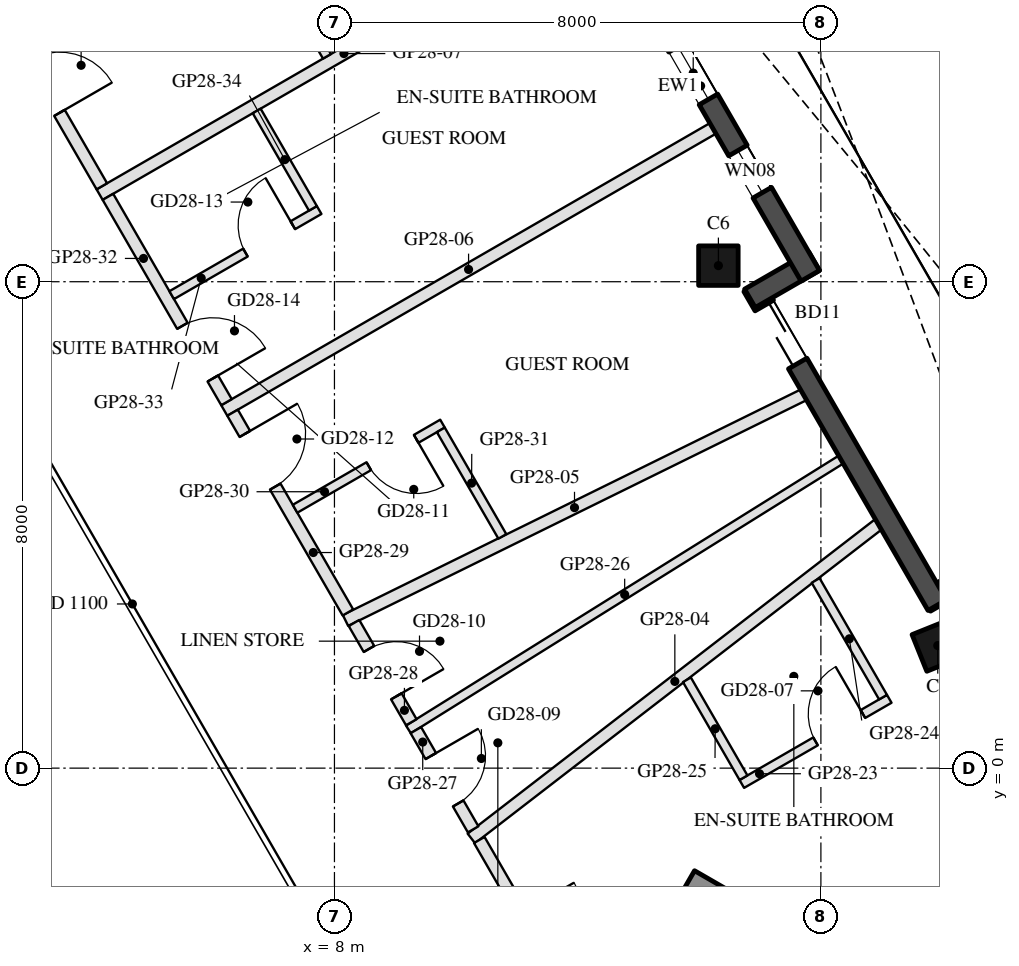
"""IFC4 building model, lengths in metres.
Left out: names, types, materials, properties, quantities, classifications, styles, units other than length and angle.
Written with IfcOpenShell. Run it as: python <this file> out.ifc"""

import sys

from ifc_helpers import new_model, si_unit, direction, frame, frame_2d, origin, origin_2d, place, context, subcontext, project, spatial, rectangle, hollow_rectangle, extrude, boolean, halfspace, element, fill, save


model = new_model("IFC4")
c1 = context("Model", 3, precision=1e-05, world=origin(), true_north=direction((0.0, 1.0)))
c2 = subcontext(c1, "Body", "Model", "MODEL_VIEW")
j1 = project(units=[si_unit("LENGTHUNIT", "METRE"), si_unit("PLANEANGLEUNIT", "RADIAN")], contexts=[c1])
p1 = place(None, origin())
s1 = spatial("IfcSite", under=j1, at=p1, CompositionType="ELEMENT")
p2 = place(p1, origin())
s2 = spatial("IfcBuilding", under=s1, at=p2, CompositionType="ELEMENT")
p3 = place(p2, frame((0.0, 0.0, 287.4)))
s3 = spatial("IfcBuildingStorey", under=s2, at=p3, CompositionType="ELEMENT", Elevation=287.4)
p4 = place(p3, frame((17.922, 2.016, 0.0), z_axis=(-0.161441555696, -0.022914285325, 0.986616216987), x_axis=(0.49507293815, -0.866715878813, 0.060879974747)))
e1 = element("IfcColumn", 1, at=p4, inside=s3, PredefinedType="COLUMN", context=c2, shape_type="SweptSolid", body=[
    boolean("DIFFERENCE", boolean("DIFFERENCE", extrude(hollow_rectangle(XDim=0.65, YDim=0.65, WallThickness=0.03, at=origin_2d()), origin(), (0.0, 0.0, 1.0), 3.75), halfspace(frame((0.0, 0.0, 0.04), z_axis=(0.0, 0.0, 1.0), x_axis=(1.0, 0.0, 0.0)), True)), halfspace(frame((0.0, 0.0, 3.711), z_axis=(0.0, 0.0, 1.0), x_axis=(1.0, 0.0, 0.0)), False)),
])
p5 = place(p3, frame((14.314, 8.264, 0.0), z_axis=(-0.13115563542, -0.07578460883, 0.988460870425), x_axis=(-0.500216662803, 0.86590027717, 1.5862574e-05)))
e2 = element("IfcColumn", 2, at=p5, inside=s3, PredefinedType="COLUMN", context=c2, shape_type="SweptSolid", body=[
    boolean("DIFFERENCE", boolean("DIFFERENCE", extrude(hollow_rectangle(XDim=0.65, YDim=0.65, WallThickness=0.03, at=origin_2d()), origin(), (0.0, 0.0, 1.0), 3.743), halfspace(frame((0.0, 0.0, 0.037), z_axis=(0.0, 0.0, 1.0), x_axis=(1.0, 0.0, 0.0)), True)), halfspace(frame((0.0, 0.0, 3.706), z_axis=(0.0, 0.0, 1.0), x_axis=(1.0, 0.0, 0.0)), False)),
])
p6 = place(p3, frame((18.772, 3.344, 0.0), z_axis=(0.0, 0.0, 1.0), x_axis=(-0.866005645448, -0.500034220881, 0.0)))
e3 = element("IfcWall", 3, at=p6, inside=s3, PredefinedType="SOLIDWALL", context=c2, shape_type="SweptSolid", body=[
    extrude(rectangle(XDim=1.22, YDim=0.35, at=frame_2d((0.61, 0.0))), origin(), (0.0, 0.0, 1.0), 3.55),
])
p7 = place(p3, frame((17.913, 2.68, 0.0), z_axis=(0.0, 0.0, 1.0), x_axis=(-0.499985371027, 0.866033849661, 0.0)))
e4 = element("IfcWall", 4, at=p7, inside=s3, PredefinedType="SOLIDWALL", context=c2, shape_type="SweptSolid", body=[
    extrude(rectangle(XDim=6.055, YDim=0.35, at=frame_2d((3.028, 0.0))), origin(), (0.0, 0.0, 1.0), 3.55),
])
p8 = place(p7, frame((4.59, 0.0, 0.0)))
e5 = element("IfcOpeningElement", 5, at=p8, cuts=e4, PredefinedType="OPENING", context=c2, shape_type="SweptSolid", body=[
    extrude(rectangle(XDim=1.1, YDim=2.4, at=frame_2d((0.55, 1.2))), frame((0.0, 0.185, 0.0), z_axis=(0.0, -1.0, 0.0), x_axis=(1.0, 0.0, 0.0)), (0.0, 0.0, 1.0), 0.37),
])
p9 = place(p3, frame((14.833, 7.727, 0.0), z_axis=(0.0, 0.0, 1.0), x_axis=(0.866142280446, 0.499797509021, 0.0)))
e6 = element("IfcWall", 6, at=p9, inside=s3, PredefinedType="SOLIDWALL", context=c2, shape_type="SweptSolid", body=[
    extrude(rectangle(XDim=1.22, YDim=0.35, at=frame_2d((0.61, 0.0))), origin(), (0.0, 0.0, 1.0), 3.55),
])
p10 = place(p3, frame((15.825, 8.097, 0.0), z_axis=(0.0, 0.0, 1.0), x_axis=(-0.500006872736, 0.866021435772, 0.0)))
e7 = element("IfcWall", 7, at=p10, inside=s3, PredefinedType="SOLIDWALL", context=c2, shape_type="SweptSolid", body=[
    extrude(rectangle(XDim=9.015, YDim=0.35, at=frame_2d((4.508, 0.0))), origin(), (0.0, 0.0, 1.0), 3.55),
])
p11 = place(p10, frame((1.579, 0.0, 0.3)))
e8 = element("IfcOpeningElement", 8, at=p11, cuts=e7, PredefinedType="OPENING", context=c2, shape_type="SweptSolid", body=[
    extrude(rectangle(XDim=0.8, YDim=2.65, at=frame_2d((0.4, 1.325))), frame((0.0, 0.185, 0.0), z_axis=(0.0, -1.0, 0.0), x_axis=(1.0, 0.0, 0.0)), (0.0, 0.0, 1.0), 0.37),
])
p12 = place(p10, frame((4.75, 0.0, 0.0)))
e9 = element("IfcOpeningElement", 9, at=p12, cuts=e7, PredefinedType="OPENING", context=c2, shape_type="SweptSolid", body=[
    extrude(rectangle(XDim=1.8, YDim=2.4, at=frame_2d((0.9, 1.2))), frame((0.0, 0.185, 0.0), z_axis=(0.0, -1.0, 0.0), x_axis=(1.0, 0.0, 0.0)), (0.0, 0.0, 1.0), 0.37),
])
p13 = place(p10, frame((3.35, 0.0, 0.3)))
e10 = element("IfcOpeningElement", 10, at=p13, cuts=e7, PredefinedType="OPENING", context=c2, shape_type="SweptSolid", body=[
    extrude(rectangle(XDim=1.0, YDim=2.65, at=frame_2d((0.5, 1.325))), frame((0.0, 0.185, 0.0), z_axis=(0.0, -1.0, 0.0), x_axis=(1.0, 0.0, 0.0)), (0.0, 0.0, 1.0), 0.37),
])
p14 = place(p3, frame((13.797, -1.903, 0.0), z_axis=(0.0, 0.0, 1.0), x_axis=(0.866024688907, -0.500001238203, 0.0)))
e11 = element("IfcWall", 11, at=p14, inside=s3, PredefinedType="SHEAR", context=c2, shape_type="SweptSolid", body=[
    extrude(rectangle(XDim=12.129, YDim=0.5, at=frame_2d((6.064, 0.0))), origin(), (0.0, 0.0, 1.0), 3.5),
])
p15 = place(p3, frame((16.945, 4.008, 0.0), z_axis=(0.0, 0.0, 1.0), x_axis=(-0.791722394734, -0.610881043801, 0.0)))
e12 = element("IfcWall", 12, at=p15, inside=s3, PredefinedType="PARTITIONING", context=c2, shape_type="SweptSolid", body=[
    extrude(rectangle(XDim=8.454, YDim=0.2, at=frame_2d((4.227, 0.0))), origin(), (0.0, 0.0, 1.0), 3.1),
])
p16 = place(p3, frame((15.715, 6.139, 0.0), z_axis=(0.0, 0.0, 1.0), x_axis=(-0.897120508699, -0.44178591294, 0.0)))
e13 = element("IfcWall", 13, at=p16, inside=s3, PredefinedType="PARTITIONING", context=c2, shape_type="SweptSolid", body=[
    extrude(rectangle(XDim=8.397, YDim=0.2, at=frame_2d((4.198, 0.0))), origin(), (0.0, 0.0, 1.0), 3.1),
])
p17 = place(p3, frame((14.224, 10.521, 0.0), z_axis=(0.0, 0.0, 1.0), x_axis=(-0.866024341471, -0.500001839976, 0.0)))
e14 = element("IfcWall", 14, at=p17, inside=s3, PredefinedType="PARTITIONING", context=c2, shape_type="SweptSolid", body=[
    extrude(rectangle(XDim=9.279, YDim=0.2, at=frame_2d((4.639, 0.0))), origin(), (0.0, 0.0, 1.0), 3.1),
])
p18 = place(p3, frame((12.174, 14.072, 0.0), z_axis=(0.0, 0.0, 1.0), x_axis=(-0.866035734738, -0.499982105836, 0.0)))
e15 = element("IfcWall", 15, at=p18, inside=s3, PredefinedType="PARTITIONING", context=c2, shape_type="SweptSolid", body=[
    extrude(rectangle(XDim=9.279, YDim=0.2, at=frame_2d((4.639, 0.0))), origin(), (0.0, 0.0, 1.0), 3.1),
])
p19 = place(p3, frame((10.382, -1.182, 0.0), z_axis=(0.0, 0.0, 1.0), x_axis=(0.50002859319, -0.866008894869, 0.0)))
e16 = element("IfcWall", 16, at=p19, inside=s3, PredefinedType="PARTITIONING", context=c2, shape_type="SweptSolid", body=[
    extrude(rectangle(XDim=3.774, YDim=0.2, at=frame_2d((1.887, 0.0))), origin(), (0.0, 0.0, 1.0), 3.05),
])
p20 = place(p19, frame((1.387, 0.0, 0.0)))
e17 = element("IfcOpeningElement", 17, at=p20, cuts=e16, PredefinedType="OPENING", context=c2, shape_type="SweptSolid", body=[
    extrude(rectangle(XDim=1.0, YDim=2.1, at=frame_2d((0.5, 1.05))), frame((0.0, 0.11, 0.0), z_axis=(0.0, -1.0, 0.0), x_axis=(1.0, 0.0, 0.0)), (0.0, 0.0, 1.0), 0.22),
])
p21 = place(p3, frame((14.699, -0.26, 0.0), z_axis=(0.0, 0.0, 1.0), x_axis=(0.866034573852, 0.49998411664, 0.0)))
e18 = element("IfcWall", 18, at=p21, inside=s3, PredefinedType="PARTITIONING", context=c2, shape_type="SweptSolid", body=[
    extrude(rectangle(XDim=2.8, YDim=0.15, at=frame_2d((1.4, 0.0))), origin(), (0.0, 0.0, 1.0), 3.1),
])
p22 = place(p21, frame((1.4, 0.0, 0.0)))
e19 = element("IfcOpeningElement", 19, at=p22, cuts=e18, PredefinedType="OPENING", context=c2, shape_type="SweptSolid", body=[
    extrude(rectangle(XDim=0.9, YDim=2.1, at=frame_2d((0.45, 1.05))), frame((0.0, 0.085, 0.0), z_axis=(0.0, -1.0, 0.0), x_axis=(1.0, 0.0, 0.0)), (0.0, 0.0, 1.0), 0.17),
])
p23 = place(p3, frame((17.022, 1.167, 0.0), z_axis=(0.0, 0.0, 1.0), x_axis=(-0.499954515395, 0.866051662741, 0.0)))
e20 = element("IfcWall", 20, at=p23, inside=s3, PredefinedType="PARTITIONING", context=c2, shape_type="SweptSolid", body=[
    extrude(rectangle(XDim=2.216, YDim=0.15, at=frame_2d((1.108, 0.0))), origin(), (0.0, 0.0, 1.0), 3.05),
])
p24 = place(p3, frame((14.727, -0.158, 0.0), z_axis=(0.0, 0.0, 1.0), x_axis=(-0.499964847546, 0.866045698112, 0.0)))
e21 = element("IfcWall", 21, at=p24, inside=s3, PredefinedType="PARTITIONING", context=c2, shape_type="SweptSolid", body=[
    extrude(rectangle(XDim=1.86, YDim=0.15, at=frame_2d((0.93, 0.0))), origin(), (0.0, 0.0, 1.0), 3.05),
])
p25 = place(p3, frame((16.33, 5.074, 0.0), z_axis=(0.0, 0.0, 1.0), x_axis=(-0.848469139967, -0.52924485687, 0.0)))
e22 = element("IfcWall", 22, at=p25, inside=s3, PredefinedType="PARTITIONING", context=c2, shape_type="SweptSolid", body=[
    extrude(rectangle(XDim=8.384, YDim=0.15, at=frame_2d((4.192, 0.0))), origin(), (0.0, 0.0, 1.0), 3.1),
])
p26 = place(p3, frame((9.339, 0.625, 0.0), z_axis=(0.0, 0.0, 1.0), x_axis=(0.499999106059, -0.866025919901, 0.0)))
e23 = element("IfcWall", 23, at=p26, inside=s3, PredefinedType="PARTITIONING", context=c2, shape_type="SweptSolid", body=[
    extrude(rectangle(XDim=1.884, YDim=0.2, at=frame_2d((0.942, 0.0))), origin(), (0.0, 0.0, 1.0), 3.55),
])
p27 = place(p26, frame((0.492, 0.0, 0.0)))
e24 = element("IfcOpeningElement", 24, at=p27, cuts=e23, PredefinedType="OPENING", context=c2, shape_type="SweptSolid", body=[
    extrude(rectangle(XDim=0.9, YDim=2.1, at=frame_2d((0.45, 1.05))), frame((0.0, 0.11, 0.0), z_axis=(0.0, -1.0, 0.0), x_axis=(1.0, 0.0, 0.0)), (0.0, 0.0, 1.0), 0.22),
])
p28 = place(p3, frame((8.321, 2.387, 0.0), z_axis=(0.0, 0.0, 1.0), x_axis=(0.500081217305, -0.865978507874, 0.0)))
e25 = element("IfcWall", 25, at=p28, inside=s3, PredefinedType="PARTITIONING", context=c2, shape_type="SweptSolid", body=[
    extrude(rectangle(XDim=1.885, YDim=0.2, at=frame_2d((0.942, 0.0))), origin(), (0.0, 0.0, 1.0), 3.05),
])
p29 = place(p28, frame((0.492, 0.0, 0.0)))
e26 = element("IfcOpeningElement", 26, at=p29, cuts=e25, PredefinedType="OPENING", context=c2, shape_type="SweptSolid", body=[
    extrude(rectangle(XDim=0.9, YDim=2.1, at=frame_2d((0.45, 1.05))), frame((0.0, 0.11, 0.0), z_axis=(0.0, -1.0, 0.0), x_axis=(1.0, 0.0, 0.0)), (0.0, 0.0, 1.0), 0.22),
])
p30 = place(p3, frame((6.325, 5.845, 0.0), z_axis=(0.0, 0.0, 1.0), x_axis=(0.499988034227, -0.866032312117, 0.0)))
e27 = element("IfcWall", 27, at=p30, inside=s3, PredefinedType="PARTITIONING", context=c2, shape_type="SweptSolid", body=[
    extrude(rectangle(XDim=3.793, YDim=0.2, at=frame_2d((1.896, 0.0))), origin(), (0.0, 0.0, 1.0), 3.05),
])
p31 = place(p30, frame((0.403, 0.0, 0.0)))
e28 = element("IfcOpeningElement", 28, at=p31, cuts=e27, PredefinedType="OPENING", context=c2, shape_type="SweptSolid", body=[
    extrude(rectangle(XDim=1.0, YDim=2.1, at=frame_2d((0.5, 1.05))), frame((0.0, 0.11, 0.0), z_axis=(0.0, -1.0, 0.0), x_axis=(1.0, 0.0, 0.0)), (0.0, 0.0, 1.0), 0.22),
])
p32 = place(p3, frame((9.777, 5.666, 0.0), z_axis=(0.0, 0.0, 1.0), x_axis=(-0.865996816683, -0.500049511043, 0.0)))
e29 = element("IfcWall", 29, at=p32, inside=s3, PredefinedType="PARTITIONING", context=c2, shape_type="SweptSolid", body=[
    extrude(rectangle(XDim=2.8, YDim=0.15, at=frame_2d((1.4, 0.0))), origin(), (0.0, 0.0, 1.0), 3.05),
])
p33 = place(p32, frame((0.5, 0.0, 0.0)))
e30 = element("IfcOpeningElement", 30, at=p33, cuts=e29, PredefinedType="OPENING", context=c2, shape_type="SweptSolid", body=[
    extrude(rectangle(XDim=0.9, YDim=2.1, at=frame_2d((0.45, 1.05))), frame((0.0, 0.085, 0.0), z_axis=(0.0, -1.0, 0.0), x_axis=(1.0, 0.0, 0.0)), (0.0, 0.0, 1.0), 0.17),
])
p34 = place(p3, frame((10.761, 3.811, 0.0), z_axis=(0.0, 0.0, 1.0), x_axis=(-0.499941815747, 0.866058993873, 0.0)))
e31 = element("IfcWall", 31, at=p34, inside=s3, PredefinedType="PARTITIONING", context=c2, shape_type="SweptSolid", body=[
    extrude(rectangle(XDim=2.023, YDim=0.15, at=frame_2d((1.012, 0.0))), origin(), (0.0, 0.0, 1.0), 3.05),
])
p35 = place(p3, frame((4.275, 9.396, 0.0), z_axis=(0.0, 0.0, 1.0), x_axis=(0.499997012787, -0.866027128446, 0.0)))
e32 = element("IfcWall", 32, at=p35, inside=s3, PredefinedType="PARTITIONING", context=c2, shape_type="SweptSolid", body=[
    extrude(rectangle(XDim=3.9, YDim=0.2, at=frame_2d((1.95, 0.0))), origin(), (0.0, 0.0, 1.0), 3.05),
])
p36 = place(p35, frame((2.45, 0.0, 0.0)))
e33 = element("IfcOpeningElement", 33, at=p36, cuts=e32, PredefinedType="OPENING", context=c2, shape_type="SweptSolid", body=[
    extrude(rectangle(XDim=1.0, YDim=2.1, at=frame_2d((0.5, 1.05))), frame((0.0, 0.11, 0.0), z_axis=(0.0, -1.0, 0.0), x_axis=(1.0, 0.0, 0.0)), (0.0, 0.0, 1.0), 0.22),
])
p37 = place(p3, frame((5.324, 7.779, 0.0), z_axis=(0.0, 0.0, 1.0), x_axis=(0.865996816683, 0.500049511043, 0.0)))
e34 = element("IfcWall", 34, at=p37, inside=s3, PredefinedType="PARTITIONING", context=c2, shape_type="SweptSolid", body=[
    extrude(rectangle(XDim=2.8, YDim=0.15, at=frame_2d((1.4, 0.0))), origin(), (0.0, 0.0, 1.0), 3.55),
])
p38 = place(p37, frame((1.4, 0.0, 0.0)))
e35 = element("IfcOpeningElement", 35, at=p38, cuts=e34, PredefinedType="OPENING", context=c2, shape_type="SweptSolid", body=[
    extrude(rectangle(XDim=0.9, YDim=2.1, at=frame_2d((0.45, 1.05))), frame((0.0, 0.085, 0.0), z_axis=(0.0, -1.0, 0.0), x_axis=(1.0, 0.0, 0.0)), (0.0, 0.0, 1.0), 0.17),
])
p39 = place(p3, frame((7.646, 9.207, 0.0), z_axis=(0.0, 0.0, 1.0), x_axis=(-0.49994333299, 0.866058118026, 0.0)))
e36 = element("IfcWall", 36, at=p39, inside=s3, PredefinedType="PARTITIONING", context=c2, shape_type="SweptSolid", body=[
    extrude(rectangle(XDim=1.85, YDim=0.15, at=frame_2d((0.925, 0.0))), origin(), (0.0, 0.0, 1.0), 3.55),
])
p40 = place(p3, frame((2.281, 12.85, 0.0), z_axis=(0.0, 0.0, 1.0), x_axis=(0.499979074716, -0.866037484666, 0.0)))
e37 = element("IfcWall", 37, at=p40, inside=s3, PredefinedType="PARTITIONING", context=c2, shape_type="SweptSolid", body=[
    extrude(rectangle(XDim=3.788, YDim=0.2, at=frame_2d((1.894, 0.0))), origin(), (0.0, 0.0, 1.0), 3.05),
])
p41 = place(p40, frame((1.394, 0.0, 0.0)))
e38 = element("IfcOpeningElement", 38, at=p41, cuts=e37, PredefinedType="OPENING", context=c2, shape_type="SweptSolid", body=[
    extrude(rectangle(XDim=1.0, YDim=2.1, at=frame_2d((0.5, 1.05))), frame((0.0, 0.11, 0.0), z_axis=(0.0, -1.0, 0.0), x_axis=(1.0, 0.0, 0.0)), (0.0, 0.0, 1.0), 0.22),
])
p42 = place(p3, frame((7.877, 11.707, 0.0), z_axis=(0.0, 0.0, 1.0), x_axis=(-0.499985172903, 0.866033964044, 0.0)))
e39 = element("IfcWall", 39, at=p42, inside=s3, PredefinedType="PARTITIONING", context=c2, shape_type="SweptSolid", body=[
    extrude(rectangle(XDim=1.85, YDim=0.15, at=frame_2d((0.925, 0.0))), origin(), (0.0, 0.0, 1.0), 3.05),
])
p43 = place(p8, frame((1.1, 0.0, 0.0), z_axis=(0.0, 0.0, 1.0), x_axis=(-1.0, 0.0, 0.0)))
e40 = element("IfcDoor", 40, at=p43, inside=s3, OperationType="SLIDING_TO_LEFT", PredefinedType="DOOR", context=c2, shape_type="SweptSolid", body=[
    extrude(rectangle(XDim=1.1, YDim=2.4, at=frame_2d((0.55, 1.2))), frame((0.0, 0.025, 0.0), z_axis=(0.0, -1.0, 0.0), x_axis=(1.0, 0.0, 0.0)), (0.0, 0.0, 1.0), 0.05),
])
fill(e5, e40)
p44 = place(p11, origin())
e41 = element("IfcWindow", 41, at=p44, inside=s3, PartitioningType="SINGLE_PANEL", PredefinedType="WINDOW", context=c2, shape_type="SweptSolid", body=[
    extrude(rectangle(XDim=0.8, YDim=2.65, at=frame_2d((0.4, 1.325))), frame((0.0, 0.03, 0.0), z_axis=(0.0, -1.0, 0.0), x_axis=(1.0, 0.0, 0.0)), (0.0, 0.0, 1.0), 0.06),
])
fill(e8, e41)
p45 = place(p13, origin())
e42 = element("IfcWindow", 42, at=p45, inside=s3, PartitioningType="SINGLE_PANEL", PredefinedType="WINDOW", context=c2, shape_type="SweptSolid", body=[
    extrude(rectangle(XDim=1.0, YDim=2.65, at=frame_2d((0.5, 1.325))), frame((0.0, 0.03, 0.0), z_axis=(0.0, -1.0, 0.0), x_axis=(1.0, 0.0, 0.0)), (0.0, 0.0, 1.0), 0.06),
])
fill(e10, e42)
p46 = place(p22, origin())
e43 = element("IfcDoor", 43, at=p46, inside=s3, OperationType="SINGLE_SWING_RIGHT", PredefinedType="DOOR", context=c2, shape_type="SweptSolid", body=[
    extrude(rectangle(XDim=0.9, YDim=2.1, at=frame_2d((0.45, 1.05))), frame((0.0, 0.025, 0.0), z_axis=(0.0, -1.0, 0.0), x_axis=(1.0, 0.0, 0.0)), (0.0, 0.0, 1.0), 0.05),
])
fill(e19, e43)
p47 = place(p27, origin())
e44 = element("IfcDoor", 44, at=p47, inside=s3, OperationType="SINGLE_SWING_LEFT", PredefinedType="DOOR", context=c2, shape_type="SweptSolid", body=[
    extrude(rectangle(XDim=0.9, YDim=2.1, at=frame_2d((0.45, 1.05))), frame((0.0, 0.025, 0.0), z_axis=(0.0, -1.0, 0.0), x_axis=(1.0, 0.0, 0.0)), (0.0, 0.0, 1.0), 0.05),
])
fill(e24, e44)
p48 = place(p29, origin())
e45 = element("IfcDoor", 45, at=p48, inside=s3, OperationType="SINGLE_SWING_RIGHT", PredefinedType="DOOR", context=c2, shape_type="SweptSolid", body=[
    extrude(rectangle(XDim=0.9, YDim=2.1, at=frame_2d((0.45, 1.05))), frame((0.0, 0.025, 0.0), z_axis=(0.0, -1.0, 0.0), x_axis=(1.0, 0.0, 0.0)), (0.0, 0.0, 1.0), 0.05),
])
fill(e26, e45)
p49 = place(p33, origin())
e46 = element("IfcDoor", 46, at=p49, inside=s3, OperationType="SINGLE_SWING_LEFT", PredefinedType="DOOR", context=c2, shape_type="SweptSolid", body=[
    extrude(rectangle(XDim=0.9, YDim=2.1, at=frame_2d((0.45, 1.05))), frame((0.0, 0.025, 0.0), z_axis=(0.0, -1.0, 0.0), x_axis=(1.0, 0.0, 0.0)), (0.0, 0.0, 1.0), 0.05),
])
fill(e30, e46)
p50 = place(p31, origin())
e47 = element("IfcDoor", 47, at=p50, inside=s3, OperationType="SINGLE_SWING_LEFT", PredefinedType="DOOR", context=c2, shape_type="SweptSolid", body=[
    extrude(rectangle(XDim=1.0, YDim=2.1, at=frame_2d((0.5, 1.05))), frame((0.0, 0.025, 0.0), z_axis=(0.0, -1.0, 0.0), x_axis=(1.0, 0.0, 0.0)), (0.0, 0.0, 1.0), 0.05),
])
fill(e28, e47)
p51 = place(p38, origin())
e48 = element("IfcDoor", 48, at=p51, inside=s3, OperationType="SINGLE_SWING_RIGHT", PredefinedType="DOOR", context=c2, shape_type="SweptSolid", body=[
    extrude(rectangle(XDim=0.9, YDim=2.1, at=frame_2d((0.45, 1.05))), frame((0.0, 0.025, 0.0), z_axis=(0.0, -1.0, 0.0), x_axis=(1.0, 0.0, 0.0)), (0.0, 0.0, 1.0), 0.05),
])
fill(e35, e48)
p52 = place(p36, origin())
e49 = element("IfcDoor", 49, at=p52, inside=s3, OperationType="SINGLE_SWING_RIGHT", PredefinedType="DOOR", context=c2, shape_type="SweptSolid", body=[
    extrude(rectangle(XDim=1.0, YDim=2.1, at=frame_2d((0.5, 1.05))), frame((0.0, 0.025, 0.0), z_axis=(0.0, -1.0, 0.0), x_axis=(1.0, 0.0, 0.0)), (0.0, 0.0, 1.0), 0.05),
])
fill(e33, e49)
p53 = place(p41, origin())
e50 = element("IfcDoor", 50, at=p53, inside=s3, OperationType="SINGLE_SWING_RIGHT", PredefinedType="DOOR", context=c2, shape_type="SweptSolid", body=[
    extrude(rectangle(XDim=1.0, YDim=2.1, at=frame_2d((0.5, 1.05))), frame((0.0, 0.025, 0.0), z_axis=(0.0, -1.0, 0.0), x_axis=(1.0, 0.0, 0.0)), (0.0, 0.0, 1.0), 0.05),
])
fill(e38, e50)
save(model, sys.argv[1])
